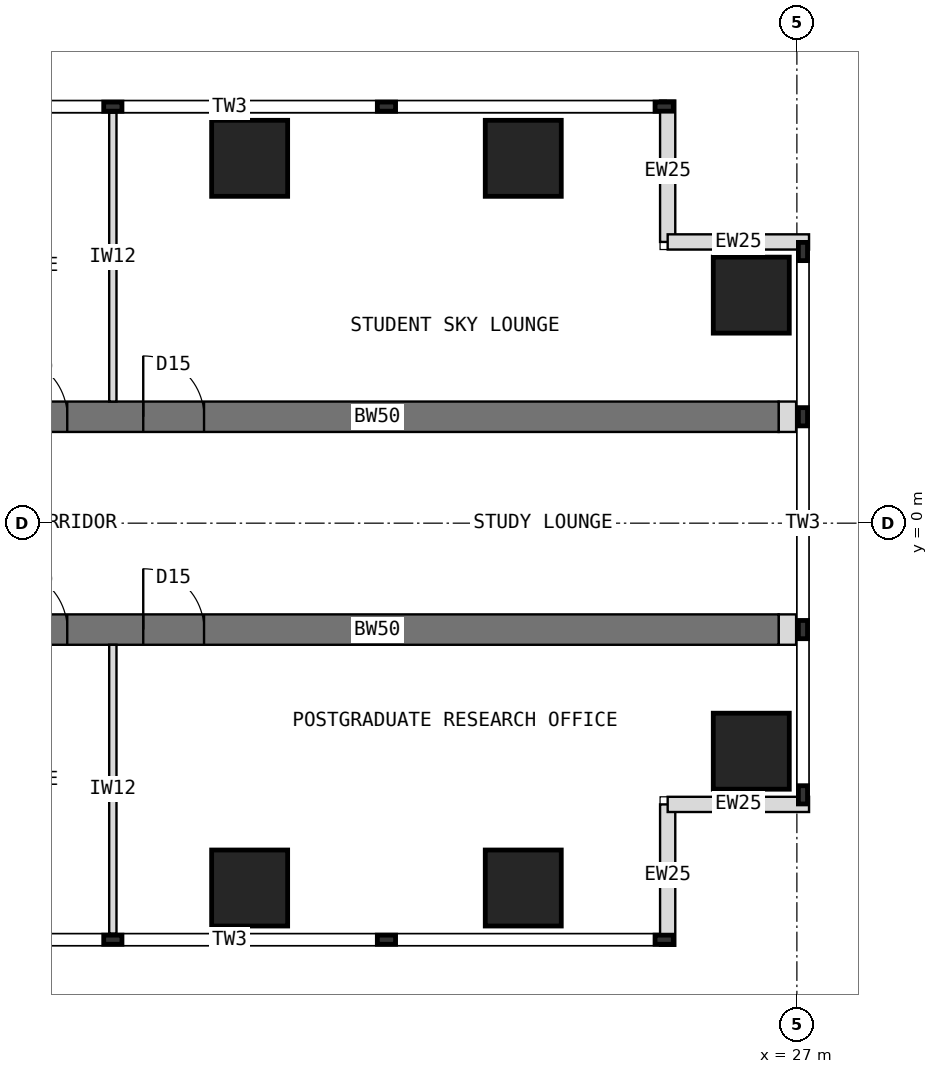
"""IFC4 building model, lengths in metres.
Left out: names, types, materials, properties, quantities, classifications, styles, units other than length and angle.
Written with IfcOpenShell. Run it as: python <this file> out.ifc"""

import sys

from ifc_helpers import new_model, si_unit, direction, frame, frame_2d, origin, origin_2d, place, context, subcontext, project, spatial, rectangle, extrude, element, fill, save


model = new_model("IFC4")
c1 = context("Model", 3, precision=1e-05, world=origin(), true_north=direction((0.0, 1.0)))
c2 = subcontext(c1, "Body", "Model", "MODEL_VIEW")
j1 = project(units=[si_unit("LENGTHUNIT", "METRE"), si_unit("PLANEANGLEUNIT", "RADIAN")], contexts=[c1])
p1 = place(None, origin())
s1 = spatial("IfcSite", under=j1, at=p1, CompositionType="ELEMENT")
p2 = place(p1, origin())
s2 = spatial("IfcBuilding", under=s1, at=p2, CompositionType="ELEMENT")
p3 = place(p2, frame((0.0, 0.0, 170.5)))
s3 = spatial("IfcBuildingStorey", under=s2, at=p3, CompositionType="ELEMENT", Elevation=170.5)
p4 = place(p3, frame((13.5, 1.75, 0.0), z_axis=(0.0, 0.0, 1.0), x_axis=(1.0, 0.0, 0.0)))
e1 = element("IfcWall", 1, at=p4, inside=s3, PredefinedType="SHEAR", context=c2, shape_type="SweptSolid", body=[
    extrude(rectangle(XDim=13.2, YDim=0.5, at=frame_2d((6.6, 0.0))), origin(), (0.0, 0.0, 1.0), 4.0),
])
p5 = place(p4, frame((0.5, 0.0, 0.0)))
e2 = element("IfcOpeningElement", 2, at=p5, cuts=e1, PredefinedType="OPENING", context=c2, shape_type="SweptSolid", body=[
    extrude(rectangle(XDim=1.0, YDim=2.1, at=frame_2d((0.5, 1.05))), frame((0.0, 0.26, 0.0), z_axis=(0.0, -1.0, 0.0), x_axis=(1.0, 0.0, 0.0)), (0.0, 0.0, 1.0), 0.52),
])
p6 = place(p4, frame((2.75, 0.0, 0.0)))
e3 = element("IfcOpeningElement", 3, at=p6, cuts=e1, PredefinedType="OPENING", context=c2, shape_type="SweptSolid", body=[
    extrude(rectangle(XDim=1.0, YDim=2.1, at=frame_2d((0.5, 1.05))), frame((0.0, 0.26, 0.0), z_axis=(0.0, -1.0, 0.0), x_axis=(1.0, 0.0, 0.0)), (0.0, 0.0, 1.0), 0.52),
])
p7 = place(p3, frame((13.5, -1.75, 0.0), z_axis=(0.0, 0.0, 1.0), x_axis=(1.0, 0.0, 0.0)))
e4 = element("IfcWall", 4, at=p7, inside=s3, PredefinedType="SHEAR", context=c2, shape_type="SweptSolid", body=[
    extrude(rectangle(XDim=13.2, YDim=0.5, at=frame_2d((6.6, 0.0))), origin(), (0.0, 0.0, 1.0), 4.0),
])
p8 = place(p7, frame((0.5, 0.0, 0.0)))
e5 = element("IfcOpeningElement", 5, at=p8, cuts=e4, PredefinedType="OPENING", context=c2, shape_type="SweptSolid", body=[
    extrude(rectangle(XDim=1.0, YDim=2.1, at=frame_2d((0.5, 1.05))), frame((0.0, 0.26, 0.0), z_axis=(0.0, -1.0, 0.0), x_axis=(1.0, 0.0, 0.0)), (0.0, 0.0, 1.0), 0.52),
])
p9 = place(p7, frame((2.75, 0.0, 0.0)))
e6 = element("IfcOpeningElement", 6, at=p9, cuts=e4, PredefinedType="OPENING", context=c2, shape_type="SweptSolid", body=[
    extrude(rectangle(XDim=1.0, YDim=2.1, at=frame_2d((0.5, 1.05))), frame((0.0, 0.26, 0.0), z_axis=(0.0, -1.0, 0.0), x_axis=(1.0, 0.0, 0.0)), (0.0, 0.0, 1.0), 0.52),
])
for number, where, z_axis, x_axis in (
    (7, (18.0, 6.0, 0.0), (0.0, 0.0, 1.0), (1.0, 0.0, 0.0)),
    (8, (18.0, -6.0, 0.0), (0.0, 0.0, 1.0), (1.0, 0.0, 0.0)),
    (9, (22.5, 6.0, 0.0), (0.0, 0.0, 1.0), (1.0, 0.0, 0.0)),
    (10, (22.5, -6.0, 0.0), (0.0, 0.0, 1.0), (1.0, 0.0, 0.0)),
    (11, (26.25, 3.75, 0.0), (0.0, 0.0, 1.0), (1.0, 0.0, 0.0)),
    (12, (26.25, -3.75, 0.0), (0.0, 0.0, 1.0), (1.0, 0.0, 0.0)),
):
    element("IfcColumn", number, at=place(p3, frame(where, z_axis=z_axis, x_axis=x_axis)), inside=s3, PredefinedType="COLUMN", context=c2, shape_type="SweptSolid", body=[
        extrude(rectangle(XDim=1.25, YDim=1.25, at=origin_2d()), origin(), (0.0, 0.0, 1.0), 4.0),
    ])
for number, where, z_axis, x_axis in (
    (13, (24.875, 6.95, 0.0), (0.0, 0.0, 1.0), (0.0, -1.0, 0.0)),
    (14, (24.875, 4.625, 0.0), (0.0, 0.0, 1.0), (1.0, 0.0, 0.0)),
    (15, (24.875, -6.95, 0.0), (0.0, 0.0, 1.0), (0.0, 1.0, 0.0)),
    (16, (24.875, -4.625, 0.0), (0.0, 0.0, 1.0), (1.0, 0.0, 0.0)),
):
    element("IfcWall", number, at=place(p3, frame(where, z_axis=z_axis, x_axis=x_axis)), inside=s3, PredefinedType="STANDARD", context=c2, shape_type="SweptSolid", body=[
        extrude(rectangle(XDim=2.325, YDim=0.25, at=frame_2d((1.163, 0.0))), origin(), (0.0, 0.0, 1.0), 3.8),
    ])
for number, where, z_axis, x_axis in (
    (17, (26.7, 1.75, 0.0), (0.0, 0.0, 1.0), (1.0, 0.0, 0.0)),
    (18, (26.7, -1.75, 0.0), (0.0, 0.0, 1.0), (1.0, 0.0, 0.0)),
):
    element("IfcWall", number, at=place(p3, frame(where, z_axis=z_axis, x_axis=x_axis)), inside=s3, PredefinedType="PARTITIONING", context=c2, shape_type="SweptSolid", body=[
        extrude(rectangle(XDim=0.288, YDim=0.5, at=frame_2d((0.144, 0.0))), origin(), (0.0, 0.0, 1.0), 3.8),
    ])
for number, where, z_axis, x_axis in (
    (19, (15.75, 2.0, 0.0), (0.0, 0.0, 1.0), (0.0, 1.0, 0.0)),
    (20, (15.75, -2.0, 0.0), (0.0, 0.0, 1.0), (0.0, -1.0, 0.0)),
):
    element("IfcWall", number, at=place(p3, frame(where, z_axis=z_axis, x_axis=x_axis)), inside=s3, PredefinedType="PARTITIONING", context=c2, shape_type="SweptSolid", body=[
        extrude(rectangle(XDim=4.75, YDim=0.12, at=frame_2d((2.375, 0.0))), origin(), (0.0, 0.0, 1.0), 3.8),
    ])
p10 = place(p5, origin())
e21 = element("IfcDoor", 21, at=p10, inside=s3, OperationType="SINGLE_SWING_LEFT", PredefinedType="DOOR", context=c2, shape_type="SweptSolid", body=[
    extrude(rectangle(XDim=1.0, YDim=2.1, at=frame_2d((0.5, 1.05))), frame((0.0, 0.025, 0.0), z_axis=(0.0, -1.0, 0.0), x_axis=(1.0, 0.0, 0.0)), (0.0, 0.0, 1.0), 0.05),
])
fill(e2, e21)
p11 = place(p6, origin())
e22 = element("IfcDoor", 22, at=p11, inside=s3, OperationType="SINGLE_SWING_LEFT", PredefinedType="DOOR", context=c2, shape_type="SweptSolid", body=[
    extrude(rectangle(XDim=1.0, YDim=2.1, at=frame_2d((0.5, 1.05))), frame((0.0, 0.025, 0.0), z_axis=(0.0, -1.0, 0.0), x_axis=(1.0, 0.0, 0.0)), (0.0, 0.0, 1.0), 0.05),
])
fill(e3, e22)
p12 = place(p8, origin())
e23 = element("IfcDoor", 23, at=p12, inside=s3, OperationType="SINGLE_SWING_LEFT", PredefinedType="DOOR", context=c2, shape_type="SweptSolid", body=[
    extrude(rectangle(XDim=1.0, YDim=2.1, at=frame_2d((0.5, 1.05))), frame((0.0, 0.025, 0.0), z_axis=(0.0, -1.0, 0.0), x_axis=(1.0, 0.0, 0.0)), (0.0, 0.0, 1.0), 0.05),
])
fill(e5, e23)
p13 = place(p9, origin())
e24 = element("IfcDoor", 24, at=p13, inside=s3, OperationType="SINGLE_SWING_LEFT", PredefinedType="DOOR", context=c2, shape_type="SweptSolid", body=[
    extrude(rectangle(XDim=1.0, YDim=2.1, at=frame_2d((0.5, 1.05))), frame((0.0, 0.025, 0.0), z_axis=(0.0, -1.0, 0.0), x_axis=(1.0, 0.0, 0.0)), (0.0, 0.0, 1.0), 0.05),
])
fill(e6, e24)
save(model, sys.argv[1])
